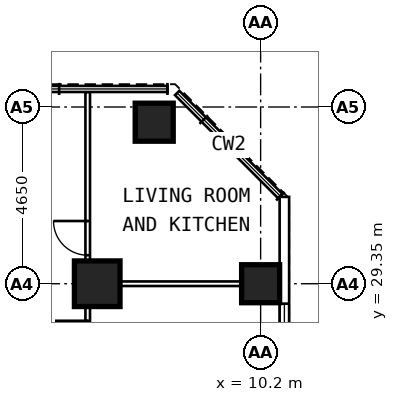
"""IFC4 building model, lengths in metres.
Left out: names, types, materials, properties, quantities, classifications, styles, units other than length and angle.
Written with IfcOpenShell. Run it as: python <this file> out.ifc"""

import sys

from ifc_helpers import new_model, si_unit, direction, frame, frame_2d, origin, origin_2d, place, context, subcontext, project, spatial, rectangle, extrude, element, fill, save


model = new_model("IFC4")
c1 = context("Model", 3, precision=1e-05, world=origin(), true_north=direction((0.0, 1.0)))
c2 = subcontext(c1, "Body", "Model", "MODEL_VIEW")
j1 = project(units=[si_unit("LENGTHUNIT", "METRE"), si_unit("PLANEANGLEUNIT", "RADIAN")], contexts=[c1])
p1 = place(None, origin())
s1 = spatial("IfcSite", under=j1, at=p1, CompositionType="ELEMENT")
p2 = place(p1, origin())
s2 = spatial("IfcBuilding", under=s1, at=p2, CompositionType="ELEMENT")
p3 = place(p2, frame((0.0, 0.0, 46.6)))
s3 = spatial("IfcBuildingStorey", under=s2, at=p3, CompositionType="ELEMENT", Elevation=46.6)
for number, where, z_axis, x_axis in (
    (1, (10.2, 29.35, 0.0), (0.0, 0.0, 1.0), (0.0, 1.0, 0.0)),
    (2, (7.4, 33.6, 0.0), (0.0, 0.0, 1.0), (0.0, 1.0, 0.0)),
):
    element("IfcColumn", number, at=place(p3, frame(where, z_axis=z_axis, x_axis=x_axis)), inside=s3, PredefinedType="COLUMN", context=c2, shape_type="SweptSolid", body=[
        extrude(rectangle(XDim=1.0, YDim=1.0, at=origin_2d()), origin(), (0.0, 0.0, 1.0), 3.6),
    ])
p4 = place(p3, frame((5.9, 29.35, 0.0), z_axis=(0.0, 0.0, 1.0), x_axis=(0.0, 1.0, 0.0)))
e3 = element("IfcColumn", 3, at=p4, inside=s3, PredefinedType="COLUMN", context=c2, shape_type="SweptSolid", body=[
    extrude(rectangle(XDim=1.2, YDim=1.2, at=origin_2d()), origin(), (0.0, 0.0, 1.0), 3.6),
])
p5 = place(p3, frame((10.825, 6.394, 0.0), z_axis=(0.0, 0.0, 1.0), x_axis=(0.0, 1.0, 0.0)))
e4 = element("IfcWall", 4, at=p5, inside=s3, PredefinedType="SOLIDWALL", context=c2, shape_type="SweptSolid", body=[
    extrude(rectangle(XDim=25.241, YDim=0.25, at=frame_2d((12.621, 0.0))), origin(), (0.0, 0.0, 1.0), 3.35),
])
p6 = place(p5, frame((0.681, 0.0, 0.8)))
e5 = element("IfcOpeningElement", 5, at=p6, cuts=e4, PredefinedType="OPENING", context=c2, shape_type="SweptSolid", body=[
    extrude(rectangle(XDim=1.8, YDim=1.8, at=frame_2d((0.9, 0.9))), frame((0.0, 0.137, 0.0), z_axis=(0.0, -1.0, 0.0), x_axis=(1.0, 0.0, 0.0)), (0.0, 0.0, 1.0), 0.274),
])
p7 = place(p5, frame((3.531, 0.0, 0.8)))
e6 = element("IfcOpeningElement", 6, at=p7, cuts=e4, PredefinedType="OPENING", context=c2, shape_type="SweptSolid", body=[
    extrude(rectangle(XDim=1.8, YDim=1.8, at=frame_2d((0.9, 0.9))), frame((0.0, 0.137, 0.0), z_axis=(0.0, -1.0, 0.0), x_axis=(1.0, 0.0, 0.0)), (0.0, 0.0, 1.0), 0.274),
])
p8 = place(p5, frame((6.381, 0.0, 0.8)))
e7 = element("IfcOpeningElement", 7, at=p8, cuts=e4, PredefinedType="OPENING", context=c2, shape_type="SweptSolid", body=[
    extrude(rectangle(XDim=1.8, YDim=1.8, at=frame_2d((0.9, 0.9))), frame((0.0, 0.137, 0.0), z_axis=(0.0, -1.0, 0.0), x_axis=(1.0, 0.0, 0.0)), (0.0, 0.0, 1.0), 0.274),
])
p9 = place(p5, frame((9.231, 0.0, 0.8)))
e8 = element("IfcOpeningElement", 8, at=p9, cuts=e4, PredefinedType="OPENING", context=c2, shape_type="SweptSolid", body=[
    extrude(rectangle(XDim=1.8, YDim=1.8, at=frame_2d((0.9, 0.9))), frame((0.0, 0.137, 0.0), z_axis=(0.0, -1.0, 0.0), x_axis=(1.0, 0.0, 0.0)), (0.0, 0.0, 1.0), 0.274),
])
p10 = place(p5, frame((12.081, 0.0, 0.8)))
e9 = element("IfcOpeningElement", 9, at=p10, cuts=e4, PredefinedType="OPENING", context=c2, shape_type="SweptSolid", body=[
    extrude(rectangle(XDim=1.8, YDim=1.8, at=frame_2d((0.9, 0.9))), frame((0.0, 0.137, 0.0), z_axis=(0.0, -1.0, 0.0), x_axis=(1.0, 0.0, 0.0)), (0.0, 0.0, 1.0), 0.274),
])
p11 = place(p5, frame((14.931, 0.0, 0.8)))
e10 = element("IfcOpeningElement", 10, at=p11, cuts=e4, PredefinedType="OPENING", context=c2, shape_type="SweptSolid", body=[
    extrude(rectangle(XDim=1.8, YDim=1.8, at=frame_2d((0.9, 0.9))), frame((0.0, 0.137, 0.0), z_axis=(0.0, -1.0, 0.0), x_axis=(1.0, 0.0, 0.0)), (0.0, 0.0, 1.0), 0.274),
])
p12 = place(p5, frame((17.781, 0.0, 0.8)))
e11 = element("IfcOpeningElement", 11, at=p12, cuts=e4, PredefinedType="OPENING", context=c2, shape_type="SweptSolid", body=[
    extrude(rectangle(XDim=1.8, YDim=1.8, at=frame_2d((0.9, 0.9))), frame((0.0, 0.137, 0.0), z_axis=(0.0, -1.0, 0.0), x_axis=(1.0, 0.0, 0.0)), (0.0, 0.0, 1.0), 0.274),
])
p13 = place(p5, frame((20.631, 0.0, 0.8)))
e12 = element("IfcOpeningElement", 12, at=p13, cuts=e4, PredefinedType="OPENING", context=c2, shape_type="SweptSolid", body=[
    extrude(rectangle(XDim=1.8, YDim=1.8, at=frame_2d((0.9, 0.9))), frame((0.0, 0.137, 0.0), z_axis=(0.0, -1.0, 0.0), x_axis=(1.0, 0.0, 0.0)), (0.0, 0.0, 1.0), 0.274),
])
p14 = place(p3, frame((5.65, 18.05, 0.0), z_axis=(0.0, 0.0, 1.0), x_axis=(0.0, 1.0, 0.0)))
e13 = element("IfcWall", 13, at=p14, inside=s3, PredefinedType="PARTITIONING", context=c2, shape_type="SweptSolid", body=[
    extrude(rectangle(XDim=16.345, YDim=0.12, at=frame_2d((8.172, 0.0))), origin(), (0.0, 0.0, 1.0), 3.35),
])
p15 = place(p14, frame((0.875, 0.0, 0.0)))
e14 = element("IfcOpeningElement", 14, at=p15, cuts=e13, PredefinedType="OPENING", context=c2, shape_type="SweptSolid", body=[
    extrude(rectangle(XDim=0.9, YDim=2.1, at=frame_2d((0.45, 1.05))), frame((0.0, 0.072, 0.0), z_axis=(0.0, -1.0, 0.0), x_axis=(1.0, 0.0, 0.0)), (0.0, 0.0, 1.0), 0.144),
])
p16 = place(p14, frame((3.725, 0.0, 0.0)))
e15 = element("IfcOpeningElement", 15, at=p16, cuts=e13, PredefinedType="OPENING", context=c2, shape_type="SweptSolid", body=[
    extrude(rectangle(XDim=0.9, YDim=2.1, at=frame_2d((0.45, 1.05))), frame((0.0, 0.072, 0.0), z_axis=(0.0, -1.0, 0.0), x_axis=(1.0, 0.0, 0.0)), (0.0, 0.0, 1.0), 0.144),
])
p17 = place(p14, frame((6.575, 0.0, 0.0)))
e16 = element("IfcOpeningElement", 16, at=p17, cuts=e13, PredefinedType="OPENING", context=c2, shape_type="SweptSolid", body=[
    extrude(rectangle(XDim=0.9, YDim=2.1, at=frame_2d((0.45, 1.05))), frame((0.0, 0.072, 0.0), z_axis=(0.0, -1.0, 0.0), x_axis=(1.0, 0.0, 0.0)), (0.0, 0.0, 1.0), 0.144),
])
p18 = place(p14, frame((9.425, 0.0, 0.0)))
e17 = element("IfcOpeningElement", 17, at=p18, cuts=e13, PredefinedType="OPENING", context=c2, shape_type="SweptSolid", body=[
    extrude(rectangle(XDim=0.9, YDim=2.1, at=frame_2d((0.45, 1.05))), frame((0.0, 0.072, 0.0), z_axis=(0.0, -1.0, 0.0), x_axis=(1.0, 0.0, 0.0)), (0.0, 0.0, 1.0), 0.144),
])
p19 = place(p14, frame((12.05, 0.0, 0.0)))
e18 = element("IfcOpeningElement", 18, at=p19, cuts=e13, PredefinedType="OPENING", context=c2, shape_type="SweptSolid", body=[
    extrude(rectangle(XDim=0.9, YDim=2.1, at=frame_2d((0.45, 1.05))), frame((0.0, 0.072, 0.0), z_axis=(0.0, -1.0, 0.0), x_axis=(1.0, 0.0, 0.0)), (0.0, 0.0, 1.0), 0.144),
])
p20 = place(p3, frame((5.71, 29.35, 0.0), z_axis=(0.0, 0.0, 1.0), x_axis=(1.0, 0.0, 0.0)))
e19 = element("IfcWall", 19, at=p20, inside=s3, PredefinedType="PARTITIONING", context=c2, shape_type="SweptSolid", body=[
    extrude(rectangle(XDim=4.99, YDim=0.12, at=frame_2d((2.495, 0.0))), origin(), (0.0, 0.0, 1.0), 2.45),
])
p21 = place(p13, origin())
e20 = element("IfcWindow", 20, at=p21, inside=s3, PartitioningType="SINGLE_PANEL", PredefinedType="WINDOW", context=c2, shape_type="SweptSolid", body=[
    extrude(rectangle(XDim=1.8, YDim=1.8, at=frame_2d((0.9, 0.9))), frame((0.0, 0.03, 0.0), z_axis=(0.0, -1.0, 0.0), x_axis=(1.0, 0.0, 0.0)), (0.0, 0.0, 1.0), 0.06),
])
fill(e12, e20)
p22 = place(p18, origin())
e21 = element("IfcDoor", 21, at=p22, inside=s3, OperationType="SINGLE_SWING_RIGHT", PredefinedType="DOOR", context=c2, shape_type="SweptSolid", body=[
    extrude(rectangle(XDim=0.9, YDim=2.1, at=frame_2d((0.45, 1.05))), frame((0.0, 0.025, 0.0), z_axis=(0.0, -1.0, 0.0), x_axis=(1.0, 0.0, 0.0)), (0.0, 0.0, 1.0), 0.05),
])
fill(e17, e21)
p23 = place(p19, origin())
e22 = element("IfcDoor", 22, at=p23, inside=s3, OperationType="SINGLE_SWING_RIGHT", PredefinedType="DOOR", context=c2, shape_type="SweptSolid", body=[
    extrude(rectangle(XDim=0.9, YDim=2.1, at=frame_2d((0.45, 1.05))), frame((0.0, 0.025, 0.0), z_axis=(0.0, -1.0, 0.0), x_axis=(1.0, 0.0, 0.0)), (0.0, 0.0, 1.0), 0.05),
])
fill(e18, e22)
save(model, sys.argv[1])
